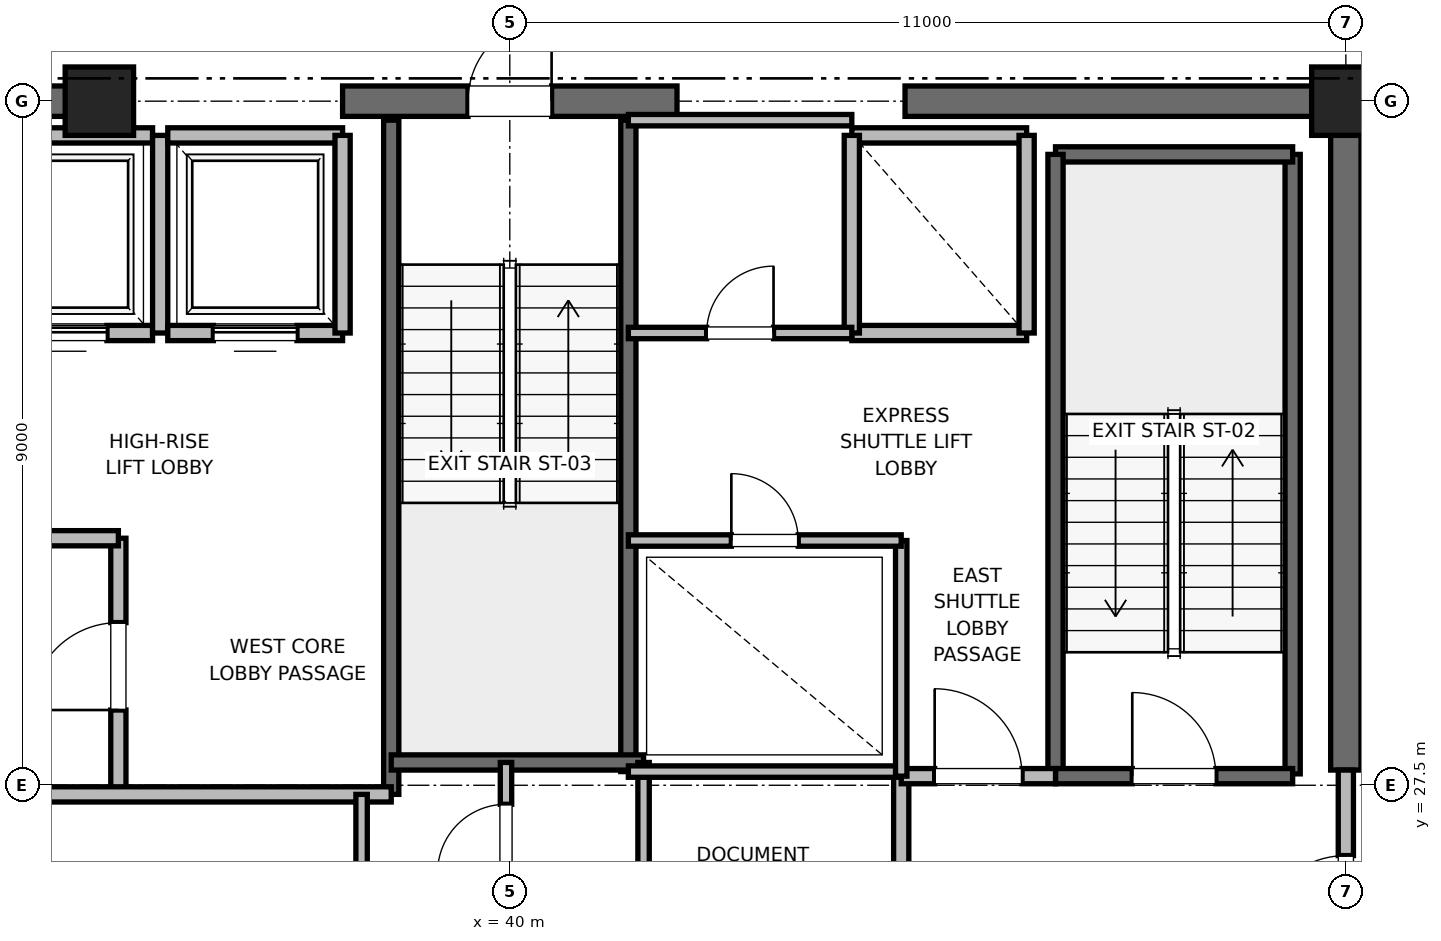
"""IFC4 building model, lengths in metres.
Left out: names, types, materials, properties, quantities, classifications, styles, units other than length and angle.
Written with IfcOpenShell. Run it as: python <this file> out.ifc"""

import sys

from ifc_helpers import new_model, si_unit, direction, frame, frame_2d, origin, origin_2d, place, context, subcontext, project, spatial, rectangle, extrude, element, fill, save


model = new_model("IFC4")
c1 = context("Model", 3, precision=1e-05, world=origin(), true_north=direction((0.0, 1.0)))
c2 = subcontext(c1, "Body", "Model", "MODEL_VIEW")
j1 = project(units=[si_unit("LENGTHUNIT", "METRE"), si_unit("PLANEANGLEUNIT", "RADIAN")], contexts=[c1])
p1 = place(None, origin())
s1 = spatial("IfcSite", under=j1, at=p1, CompositionType="ELEMENT")
p2 = place(p1, origin())
s2 = spatial("IfcBuilding", under=s1, at=p2, CompositionType="ELEMENT")
p3 = place(p2, frame((0.0, 0.0, 334.8)))
s3 = spatial("IfcBuildingStorey", under=s2, at=p3, CompositionType="ELEMENT", Elevation=334.8)
for number, where, z_axis, x_axis in (
    (1, (51.0, 36.5, 0.0), (0.0, 0.0, 1.0), (1.0, 0.0, 0.0)),
    (2, (34.6, 36.5, 0.0), (0.0, 0.0, 1.0), (1.0, 0.0, 0.0)),
):
    element("IfcColumn", number, at=place(p3, frame(where, z_axis=z_axis, x_axis=x_axis)), inside=s3, PredefinedType="PILASTER", context=c2, shape_type="SweptSolid", body=[
        extrude(rectangle(XDim=0.9, YDim=0.9, at=origin_2d()), origin(), (0.0, 0.0, 1.0), 4.0),
    ])
p4 = place(p3, frame((29.0, 36.5, 0.0), z_axis=(0.0, 0.0, 1.0), x_axis=(1.0, 0.0, 0.0)))
e3 = element("IfcWall", 3, at=p4, inside=s3, PredefinedType="SHEAR", context=c2, shape_type="SweptSolid", body=[
    extrude(rectangle(XDim=5.8, YDim=0.4, at=frame_2d((2.9, 0.0))), origin(), (0.0, 0.0, 1.0), 3.785),
])
p5 = place(p3, frame((37.8, 36.5, 0.0), z_axis=(0.0, 0.0, 1.0), x_axis=(1.0, 0.0, 0.0)))
e4 = element("IfcWall", 4, at=p5, inside=s3, PredefinedType="SHEAR", context=c2, shape_type="SweptSolid", body=[
    extrude(rectangle(XDim=4.4, YDim=0.4, at=frame_2d((2.2, 0.0))), origin(), (0.0, 0.0, 1.0), 3.785),
])
p6 = place(p5, frame((1.65, 0.0, 0.0)))
e5 = element("IfcOpeningElement", 5, at=p6, cuts=e4, PredefinedType="OPENING", context=c2, shape_type="SweptSolid", body=[
    extrude(rectangle(XDim=1.1, YDim=2.15, at=frame_2d((0.55, 1.075))), frame((0.0, 0.2, 0.0), z_axis=(0.0, -1.0, 0.0), x_axis=(1.0, 0.0, 0.0)), (0.0, 0.0, 1.0), 0.4),
])
p7 = place(p3, frame((45.2, 36.5, 0.0), z_axis=(0.0, 0.0, 1.0), x_axis=(1.0, 0.0, 0.0)))
e6 = element("IfcWall", 6, at=p7, inside=s3, PredefinedType="SHEAR", context=c2, shape_type="SweptSolid", body=[
    extrude(rectangle(XDim=5.8, YDim=0.4, at=frame_2d((2.9, 0.0))), origin(), (0.0, 0.0, 1.0), 3.785),
])
p8 = place(p3, frame((51.0, 27.7, 0.0), z_axis=(0.0, 0.0, 1.0), x_axis=(0.0, 1.0, 0.0)))
e7 = element("IfcWall", 7, at=p8, inside=s3, PredefinedType="SHEAR", context=c2, shape_type="SweptSolid", body=[
    extrude(rectangle(XDim=8.8, YDim=0.4, at=frame_2d((4.4, 0.0))), origin(), (0.0, 0.0, 1.0), 3.785),
])
p9 = place(p3, frame((50.3, 27.65, 0.0), z_axis=(0.0, 0.0, 1.0), x_axis=(0.0, 1.0, 0.0)))
e8 = element("IfcWall", 8, at=p9, inside=s3, PredefinedType="SOLIDWALL", context=c2, shape_type="SweptSolid", body=[
    extrude(rectangle(XDim=8.15, YDim=0.2, at=frame_2d((4.075, 0.0))), origin(), (0.0, 0.0, 1.0), 3.785),
])
p10 = place(p3, frame((47.18, 35.8, 0.0), z_axis=(0.0, 0.0, 1.0), x_axis=(1.0, 0.0, 0.0)))
e9 = element("IfcWall", 9, at=p10, inside=s3, PredefinedType="SOLIDWALL", context=c2, shape_type="SweptSolid", body=[
    extrude(rectangle(XDim=3.12, YDim=0.2, at=frame_2d((1.56, 0.0))), origin(), (0.0, 0.0, 1.0), 3.785),
])
p11 = place(p3, frame((47.18, 27.62, 0.0), z_axis=(0.0, 0.0, 1.0), x_axis=(0.0, 1.0, 0.0)))
e10 = element("IfcWall", 10, at=p11, inside=s3, PredefinedType="SOLIDWALL", context=c2, shape_type="SweptSolid", body=[
    extrude(rectangle(XDim=8.18, YDim=0.2, at=frame_2d((4.09, 0.0))), origin(), (0.0, 0.0, 1.0), 3.785),
])
p12 = place(p3, frame((47.18, 27.62, 0.0), z_axis=(0.0, 0.0, 1.0), x_axis=(1.0, 0.0, 0.0)))
e11 = element("IfcWall", 11, at=p12, inside=s3, PredefinedType="SOLIDWALL", context=c2, shape_type="SweptSolid", body=[
    extrude(rectangle(XDim=3.12, YDim=0.2, at=frame_2d((1.56, 0.0))), origin(), (0.0, 0.0, 1.0), 3.785),
])
p13 = place(p12, frame((1.01, 0.0, 0.0)))
e12 = element("IfcOpeningElement", 12, at=p13, cuts=e11, PredefinedType="OPENING", context=c2, shape_type="SweptSolid", body=[
    extrude(rectangle(XDim=1.1, YDim=2.15, at=frame_2d((0.55, 1.075))), frame((0.0, 0.1, 0.0), z_axis=(0.0, -1.0, 0.0), x_axis=(1.0, 0.0, 0.0)), (0.0, 0.0, 1.0), 0.2),
])
p14 = place(p3, frame((38.44, 27.38, 0.0), z_axis=(0.0, 0.0, 1.0), x_axis=(0.0, 1.0, 0.0)))
e13 = element("IfcWall", 13, at=p14, inside=s3, PredefinedType="SOLIDWALL", context=c2, shape_type="SweptSolid", body=[
    extrude(rectangle(XDim=8.87, YDim=0.2, at=frame_2d((4.435, 0.0))), origin(), (0.0, 0.0, 1.0), 3.785),
])
p15 = place(p3, frame((41.56, 27.68, 0.0), z_axis=(0.0, 0.0, 1.0), x_axis=(0.0, 1.0, 0.0)))
e14 = element("IfcWall", 14, at=p15, inside=s3, PredefinedType="SOLIDWALL", context=c2, shape_type="SweptSolid", body=[
    extrude(rectangle(XDim=8.57, YDim=0.2, at=frame_2d((4.285, 0.0))), origin(), (0.0, 0.0, 1.0), 3.785),
])
p16 = place(p3, frame((38.44, 27.8, 0.0), z_axis=(0.0, 0.0, 1.0), x_axis=(1.0, 0.0, 0.0)))
e15 = element("IfcWall", 15, at=p16, inside=s3, PredefinedType="SOLIDWALL", context=c2, shape_type="SweptSolid", body=[
    extrude(rectangle(XDim=3.32, YDim=0.2, at=frame_2d((1.66, 0.0))), origin(), (0.0, 0.0, 1.0), 3.785),
])
p17 = place(p3, frame((34.85, 27.38, 0.0), z_axis=(0.0, 0.0, 1.0), x_axis=(0.0, 1.0, 0.0)))
e16 = element("IfcWall", 16, at=p17, inside=s3, PredefinedType="PARTITIONING", context=c2, shape_type="SweptSolid", body=[
    extrude(rectangle(XDim=3.37, YDim=0.2, at=frame_2d((1.685, 0.0))), origin(), (0.0, 0.0, 1.0), 3.785),
])
p18 = place(p17, frame((1.11, 0.0, 0.0)))
e17 = element("IfcOpeningElement", 17, at=p18, cuts=e16, PredefinedType="OPENING", context=c2, shape_type="SweptSolid", body=[
    extrude(rectangle(XDim=1.15, YDim=2.2, at=frame_2d((0.575, 1.1))), frame((0.0, 0.1, 0.0), z_axis=(0.0, -1.0, 0.0), x_axis=(1.0, 0.0, 0.0)), (0.0, 0.0, 1.0), 0.2),
])
p19 = place(p3, frame((32.82, 27.38, 0.0), z_axis=(0.0, 0.0, 1.0), x_axis=(1.0, 0.0, 0.0)))
e18 = element("IfcWall", 18, at=p19, inside=s3, PredefinedType="PARTITIONING", context=c2, shape_type="SweptSolid", body=[
    extrude(rectangle(XDim=5.62, YDim=0.2, at=frame_2d((2.81, 0.0))), origin(), (0.0, 0.0, 1.0), 3.785),
])
p20 = place(p3, frame((32.15, 30.75, 0.0), z_axis=(0.0, 0.0, 1.0), x_axis=(1.0, 0.0, 0.0)))
e19 = element("IfcWall", 19, at=p20, inside=s3, PredefinedType="PARTITIONING", context=c2, shape_type="SweptSolid", body=[
    extrude(rectangle(XDim=2.7, YDim=0.2, at=frame_2d((1.35, 0.0))), origin(), (0.0, 0.0, 1.0), 3.785),
])
p21 = place(p3, frame((45.15, 24.25, 0.0), z_axis=(0.0, 0.0, 1.0), x_axis=(0.0, 1.0, 0.0)))
e20 = element("IfcWall", 20, at=p21, inside=s3, PredefinedType="PARTITIONING", context=c2, shape_type="SweptSolid", body=[
    extrude(rectangle(XDim=3.37, YDim=0.2, at=frame_2d((1.685, 0.0))), origin(), (0.0, 0.0, 1.0), 3.785),
])
p22 = place(p3, frame((45.15, 27.62, 0.0), z_axis=(0.0, 0.0, 1.0), x_axis=(1.0, 0.0, 0.0)))
e21 = element("IfcWall", 21, at=p22, inside=s3, PredefinedType="PARTITIONING", context=c2, shape_type="SweptSolid", body=[
    extrude(rectangle(XDim=2.03, YDim=0.2, at=frame_2d((1.015, 0.0))), origin(), (0.0, 0.0, 1.0), 3.785),
])
p23 = place(p22, frame((0.44, 0.0, 0.0)))
e22 = element("IfcOpeningElement", 22, at=p23, cuts=e21, PredefinedType="OPENING", context=c2, shape_type="SweptSolid", body=[
    extrude(rectangle(XDim=1.15, YDim=2.2, at=frame_2d((0.575, 1.1))), frame((0.0, 0.1, 0.0), z_axis=(0.0, -1.0, 0.0), x_axis=(1.0, 0.0, 0.0)), (0.0, 0.0, 1.0), 0.2),
])
p24 = place(p3, frame((51.0, 24.3, 0.0), z_axis=(0.0, 0.0, 1.0), x_axis=(0.0, 1.0, 0.0)))
e23 = element("IfcWall", 23, at=p24, inside=s3, PredefinedType="PARTITIONING", context=c2, shape_type="SweptSolid", body=[
    extrude(rectangle(XDim=3.4, YDim=0.2, at=frame_2d((1.7, 0.0))), origin(), (0.0, 0.0, 1.0), 2.865),
])
p25 = place(p24, frame((1.125, 0.0, 0.0)))
e24 = element("IfcOpeningElement", 24, at=p25, cuts=e23, PredefinedType="OPENING", context=c2, shape_type="SweptSolid", body=[
    extrude(rectangle(XDim=1.15, YDim=2.2, at=frame_2d((0.575, 1.1))), frame((0.0, 0.1, 0.0), z_axis=(0.0, -1.0, 0.0), x_axis=(1.0, 0.0, 0.0)), (0.0, 0.0, 1.0), 0.2),
])
p26 = place(p3, frame((33.0, 33.45, 0.0), z_axis=(0.0, 0.0, 1.0), x_axis=(1.0, 0.0, 0.0)))
e25 = element("IfcWall", 25, at=p26, inside=s3, PredefinedType="SOLIDWALL", context=c2, shape_type="SweptSolid", body=[
    extrude(rectangle(XDim=2.3, YDim=0.2, at=frame_2d((1.15, 0.0))), origin(), (0.0, 0.0, 1.0), 3.785),
])
p27 = place(p26, frame((0.6, 0.0, 0.0)))
e26 = element("IfcOpeningElement", 26, at=p27, cuts=e25, PredefinedType="OPENING", context=c2, shape_type="SweptSolid", body=[
    extrude(rectangle(XDim=1.1, YDim=2.2, at=frame_2d((0.55, 1.1))), frame((0.0, 0.1, 0.0), z_axis=(0.0, -1.0, 0.0), x_axis=(1.0, 0.0, 0.0)), (0.0, 0.0, 1.0), 0.2),
])
p28 = place(p3, frame((35.3, 36.05, 0.0), z_axis=(0.0, 0.0, 1.0), x_axis=(-1.0, 0.0, 0.0)))
e27 = element("IfcWall", 27, at=p28, inside=s3, PredefinedType="SOLIDWALL", context=c2, shape_type="SweptSolid", body=[
    extrude(rectangle(XDim=2.3, YDim=0.2, at=frame_2d((1.15, 0.0))), origin(), (0.0, 0.0, 1.0), 2.865),
])
p29 = place(p3, frame((35.4, 33.45, 0.0), z_axis=(0.0, 0.0, 1.0), x_axis=(0.0, 1.0, 0.0)))
e28 = element("IfcWall", 28, at=p29, inside=s3, PredefinedType="SOLIDWALL", context=c2, shape_type="SweptSolid", body=[
    extrude(rectangle(XDim=2.6, YDim=0.2, at=frame_2d((1.3, 0.0))), origin(), (0.0, 0.0, 1.0), 2.865),
])
p30 = place(p3, frame((35.5, 33.45, 0.0), z_axis=(0.0, 0.0, 1.0), x_axis=(1.0, 0.0, 0.0)))
e29 = element("IfcWall", 29, at=p30, inside=s3, PredefinedType="SOLIDWALL", context=c2, shape_type="SweptSolid", body=[
    extrude(rectangle(XDim=2.3, YDim=0.2, at=frame_2d((1.15, 0.0))), origin(), (0.0, 0.0, 1.0), 3.785),
])
p31 = place(p30, frame((0.6, 0.0, 0.0)))
e30 = element("IfcOpeningElement", 30, at=p31, cuts=e29, PredefinedType="OPENING", context=c2, shape_type="SweptSolid", body=[
    extrude(rectangle(XDim=1.1, YDim=2.2, at=frame_2d((0.55, 1.1))), frame((0.0, 0.1, 0.0), z_axis=(0.0, -1.0, 0.0), x_axis=(1.0, 0.0, 0.0)), (0.0, 0.0, 1.0), 0.2),
])
p32 = place(p3, frame((37.8, 36.05, 0.0), z_axis=(0.0, 0.0, 1.0), x_axis=(-1.0, 0.0, 0.0)))
e31 = element("IfcWall", 31, at=p32, inside=s3, PredefinedType="SOLIDWALL", context=c2, shape_type="SweptSolid", body=[
    extrude(rectangle(XDim=2.3, YDim=0.2, at=frame_2d((1.15, 0.0))), origin(), (0.0, 0.0, 1.0), 2.865),
])
p33 = place(p3, frame((37.8, 33.45, 0.0), z_axis=(0.0, 0.0, 1.0), x_axis=(0.0, 1.0, 0.0)))
e32 = element("IfcWall", 32, at=p33, inside=s3, PredefinedType="SOLIDWALL", context=c2, shape_type="SweptSolid", body=[
    extrude(rectangle(XDim=2.6, YDim=0.2, at=frame_2d((1.3, 0.0))), origin(), (0.0, 0.0, 1.0), 2.865),
])
p34 = place(p3, frame((44.5, 33.45, 0.0), z_axis=(0.0, 0.0, 1.0), x_axis=(1.0, 0.0, 0.0)))
e33 = element("IfcWall", 33, at=p34, inside=s3, PredefinedType="SOLIDWALL", context=c2, shape_type="SweptSolid", body=[
    extrude(rectangle(XDim=2.3, YDim=0.2, at=frame_2d((1.15, 0.0))), origin(), (0.0, 0.0, 1.0), 3.785),
])
p35 = place(p3, frame((46.8, 36.05, 0.0), z_axis=(0.0, 0.0, 1.0), x_axis=(-1.0, 0.0, 0.0)))
e34 = element("IfcWall", 34, at=p35, inside=s3, PredefinedType="SOLIDWALL", context=c2, shape_type="SweptSolid", body=[
    extrude(rectangle(XDim=2.3, YDim=0.2, at=frame_2d((1.15, 0.0))), origin(), (0.0, 0.0, 1.0), 2.865),
])
p36 = place(p3, frame((44.5, 36.05, 0.0), z_axis=(0.0, 0.0, 1.0), x_axis=(0.0, -1.0, 0.0)))
e35 = element("IfcWall", 35, at=p36, inside=s3, PredefinedType="SOLIDWALL", context=c2, shape_type="SweptSolid", body=[
    extrude(rectangle(XDim=2.6, YDim=0.2, at=frame_2d((1.3, 0.0))), origin(), (0.0, 0.0, 1.0), 2.865),
])
p37 = place(p3, frame((46.8, 33.45, 0.0), z_axis=(0.0, 0.0, 1.0), x_axis=(0.0, 1.0, 0.0)))
e36 = element("IfcWall", 36, at=p37, inside=s3, PredefinedType="SOLIDWALL", context=c2, shape_type="SweptSolid", body=[
    extrude(rectangle(XDim=2.6, YDim=0.2, at=frame_2d((1.3, 0.0))), origin(), (0.0, 0.0, 1.0), 3.785),
])
p38 = place(p3, frame((41.76, 23.8, 0.0), z_axis=(0.0, 0.0, 1.0), x_axis=(0.0, 1.0, 0.0)))
e37 = element("IfcWall", 37, at=p38, inside=s3, PredefinedType="PARTITIONING", context=c2, shape_type="SweptSolid", body=[
    extrude(rectangle(XDim=4.0, YDim=0.15, at=frame_2d((2.0, 0.0))), origin(), (0.0, 0.0, 1.0), 2.85),
])
p39 = place(p3, frame((39.95, 25.8, 0.0), z_axis=(0.0, 0.0, 1.0), x_axis=(0.0, 1.0, 0.0)))
e38 = element("IfcWall", 38, at=p39, inside=s3, PredefinedType="PARTITIONING", context=c2, shape_type="SweptSolid", body=[
    extrude(rectangle(XDim=2.0, YDim=0.15, at=frame_2d((1.0, 0.0))), origin(), (0.0, 0.0, 1.0), 2.85),
])
p40 = place(p39, frame((0.55, 0.0, 0.0)))
e39 = element("IfcOpeningElement", 39, at=p40, cuts=e38, PredefinedType="OPENING", context=c2, shape_type="SweptSolid", body=[
    extrude(rectangle(XDim=0.9, YDim=2.1, at=frame_2d((0.45, 1.05))), frame((0.0, 0.075, 0.0), z_axis=(0.0, -1.0, 0.0), x_axis=(1.0, 0.0, 0.0)), (0.0, 0.0, 1.0), 0.15),
])
p41 = place(p3, frame((38.05, 18.6, 0.0), z_axis=(0.0, 0.0, 1.0), x_axis=(0.0, 1.0, 0.0)))
e40 = element("IfcWall", 40, at=p41, inside=s3, PredefinedType="PARTITIONING", context=c2, shape_type="SweptSolid", body=[
    extrude(rectangle(XDim=8.78, YDim=0.15, at=frame_2d((4.39, 0.0))), origin(), (0.0, 0.0, 1.0), 2.85),
])
p42 = place(p41, frame((3.89, 0.0, 0.0)))
e41 = element("IfcOpeningElement", 41, at=p42, cuts=e40, PredefinedType="OPENING", context=c2, shape_type="SweptSolid", body=[
    extrude(rectangle(XDim=1.0, YDim=2.15, at=frame_2d((0.5, 1.075))), frame((0.0, 0.075, 0.0), z_axis=(0.0, -1.0, 0.0), x_axis=(1.0, 0.0, 0.0)), (0.0, 0.0, 1.0), 0.15),
])
p43 = place(p3, frame((41.56, 27.68, 0.0), z_axis=(0.0, 0.0, 1.0), x_axis=(1.0, 0.0, 0.0)))
e42 = element("IfcWall", 42, at=p43, inside=s3, PredefinedType="PARTITIONING", context=c2, shape_type="SweptSolid", body=[
    extrude(rectangle(XDim=3.59, YDim=0.15, at=frame_2d((1.795, 0.0))), origin(), (0.0, 0.0, 1.0), 2.85),
])
p44 = place(p3, frame((45.15, 27.62, 0.0), z_axis=(0.0, 0.0, 1.0), x_axis=(0.0, 1.0, 0.0)))
e43 = element("IfcWall", 43, at=p44, inside=s3, PredefinedType="PARTITIONING", context=c2, shape_type="SweptSolid", body=[
    extrude(rectangle(XDim=3.1, YDim=0.15, at=frame_2d((1.55, 0.0))), origin(), (0.0, 0.0, 1.0), 2.85),
])
p45 = place(p3, frame((41.56, 30.72, 0.0), z_axis=(0.0, 0.0, 1.0), x_axis=(1.0, 0.0, 0.0)))
e44 = element("IfcWall", 44, at=p45, inside=s3, PredefinedType="PARTITIONING", context=c2, shape_type="SweptSolid", body=[
    extrude(rectangle(XDim=3.59, YDim=0.15, at=frame_2d((1.795, 0.0))), origin(), (0.0, 0.0, 1.0), 2.85),
])
p46 = place(p45, frame((1.355, 0.0, 0.0)))
e45 = element("IfcOpeningElement", 45, at=p46, cuts=e44, PredefinedType="OPENING", context=c2, shape_type="SweptSolid", body=[
    extrude(rectangle(XDim=0.88, YDim=2.1, at=frame_2d((0.44, 1.05))), frame((0.0, 0.075, 0.0), z_axis=(0.0, -1.0, 0.0), x_axis=(1.0, 0.0, 0.0)), (0.0, 0.0, 1.0), 0.15),
])
p47 = place(p3, frame((41.56, 36.25, 0.0), z_axis=(0.0, 0.0, 1.0), x_axis=(1.0, 0.0, 0.0)))
e46 = element("IfcWall", 46, at=p47, inside=s3, PredefinedType="PARTITIONING", context=c2, shape_type="SweptSolid", body=[
    extrude(rectangle(XDim=2.94, YDim=0.15, at=frame_2d((1.47, 0.0))), origin(), (0.0, 0.0, 1.0), 2.85),
])
p48 = place(p3, frame((41.56, 33.45, 0.0), z_axis=(0.0, 0.0, 1.0), x_axis=(1.0, 0.0, 0.0)))
e47 = element("IfcWall", 47, at=p48, inside=s3, PredefinedType="PARTITIONING", context=c2, shape_type="SweptSolid", body=[
    extrude(rectangle(XDim=2.94, YDim=0.15, at=frame_2d((1.47, 0.0))), origin(), (0.0, 0.0, 1.0), 2.85),
])
p49 = place(p48, frame((1.03, 0.0, 0.0)))
e48 = element("IfcOpeningElement", 48, at=p49, cuts=e47, PredefinedType="OPENING", context=c2, shape_type="SweptSolid", body=[
    extrude(rectangle(XDim=0.88, YDim=2.1, at=frame_2d((0.44, 1.05))), frame((0.0, 0.075, 0.0), z_axis=(0.0, -1.0, 0.0), x_axis=(1.0, 0.0, 0.0)), (0.0, 0.0, 1.0), 0.15),
])
p50 = place(p13, origin())
e49 = element("IfcDoor", 49, at=p50, inside=s3, OperationType="SINGLE_SWING_LEFT", PredefinedType="DOOR", context=c2, shape_type="SweptSolid", body=[
    extrude(rectangle(XDim=1.1, YDim=2.15, at=frame_2d((0.55, 1.075))), frame((0.0, 0.025, 0.0), z_axis=(0.0, -1.0, 0.0), x_axis=(1.0, 0.0, 0.0)), (0.0, 0.0, 1.0), 0.05),
])
fill(e12, e49)
p51 = place(p6, origin())
e50 = element("IfcDoor", 50, at=p51, inside=s3, OperationType="SINGLE_SWING_RIGHT", PredefinedType="DOOR", context=c2, shape_type="SweptSolid", body=[
    extrude(rectangle(XDim=1.1, YDim=2.15, at=frame_2d((0.55, 1.075))), frame((0.0, 0.025, 0.0), z_axis=(0.0, -1.0, 0.0), x_axis=(1.0, 0.0, 0.0)), (0.0, 0.0, 1.0), 0.05),
])
fill(e5, e50)
p52 = place(p18, origin())
e51 = element("IfcDoor", 51, at=p52, inside=s3, OperationType="SINGLE_SWING_LEFT", PredefinedType="DOOR", context=c2, shape_type="SweptSolid", body=[
    extrude(rectangle(XDim=1.15, YDim=2.2, at=frame_2d((0.575, 1.1))), frame((0.0, 0.025, 0.0), z_axis=(0.0, -1.0, 0.0), x_axis=(1.0, 0.0, 0.0)), (0.0, 0.0, 1.0), 0.05),
])
fill(e17, e51)
p53 = place(p23, origin())
e52 = element("IfcDoor", 52, at=p53, inside=s3, OperationType="SINGLE_SWING_LEFT", PredefinedType="DOOR", context=c2, shape_type="SweptSolid", body=[
    extrude(rectangle(XDim=1.15, YDim=2.2, at=frame_2d((0.575, 1.1))), frame((0.0, 0.025, 0.0), z_axis=(0.0, -1.0, 0.0), x_axis=(1.0, 0.0, 0.0)), (0.0, 0.0, 1.0), 0.05),
])
fill(e22, e52)
p54 = place(p25, origin())
e53 = element("IfcDoor", 53, at=p54, inside=s3, OperationType="SINGLE_SWING_LEFT", PredefinedType="DOOR", context=c2, shape_type="SweptSolid", body=[
    extrude(rectangle(XDim=1.15, YDim=2.2, at=frame_2d((0.575, 1.1))), frame((0.0, 0.025, 0.0), z_axis=(0.0, -1.0, 0.0), x_axis=(1.0, 0.0, 0.0)), (0.0, 0.0, 1.0), 0.05),
])
fill(e24, e53)
p55 = place(p27, origin())
e54 = element("IfcDoor", 54, at=p55, inside=s3, OperationType="SLIDING_TO_RIGHT", PredefinedType="DOOR", context=c2, shape_type="SweptSolid", body=[
    extrude(rectangle(XDim=1.1, YDim=2.2, at=frame_2d((0.55, 1.1))), frame((0.0, 0.025, 0.0), z_axis=(0.0, -1.0, 0.0), x_axis=(1.0, 0.0, 0.0)), (0.0, 0.0, 1.0), 0.05),
])
fill(e26, e54)
p56 = place(p31, origin())
e55 = element("IfcDoor", 55, at=p56, inside=s3, OperationType="SLIDING_TO_RIGHT", PredefinedType="DOOR", context=c2, shape_type="SweptSolid", body=[
    extrude(rectangle(XDim=1.1, YDim=2.2, at=frame_2d((0.55, 1.1))), frame((0.0, 0.025, 0.0), z_axis=(0.0, -1.0, 0.0), x_axis=(1.0, 0.0, 0.0)), (0.0, 0.0, 1.0), 0.05),
])
fill(e30, e55)
p57 = place(p40, origin())
e56 = element("IfcDoor", 56, at=p57, inside=s3, OperationType="SINGLE_SWING_LEFT", PredefinedType="DOOR", context=c2, shape_type="SweptSolid", body=[
    extrude(rectangle(XDim=0.9, YDim=2.1, at=frame_2d((0.45, 1.05))), frame((0.0, 0.025, 0.0), z_axis=(0.0, -1.0, 0.0), x_axis=(1.0, 0.0, 0.0)), (0.0, 0.0, 1.0), 0.05),
])
fill(e39, e56)
p58 = place(p46, origin())
e57 = element("IfcDoor", 57, at=p58, inside=s3, OperationType="SINGLE_SWING_LEFT", PredefinedType="DOOR", context=c2, shape_type="SweptSolid", body=[
    extrude(rectangle(XDim=0.88, YDim=2.1, at=frame_2d((0.44, 1.05))), frame((0.0, 0.025, 0.0), z_axis=(0.0, -1.0, 0.0), x_axis=(1.0, 0.0, 0.0)), (0.0, 0.0, 1.0), 0.05),
])
fill(e45, e57)
p59 = place(p49, origin())
e58 = element("IfcDoor", 58, at=p59, inside=s3, OperationType="SINGLE_SWING_RIGHT", PredefinedType="DOOR", context=c2, shape_type="SweptSolid", body=[
    extrude(rectangle(XDim=0.88, YDim=2.1, at=frame_2d((0.44, 1.05))), frame((0.0, 0.025, 0.0), z_axis=(0.0, -1.0, 0.0), x_axis=(1.0, 0.0, 0.0)), (0.0, 0.0, 1.0), 0.05),
])
fill(e48, e58)
save(model, sys.argv[1])
